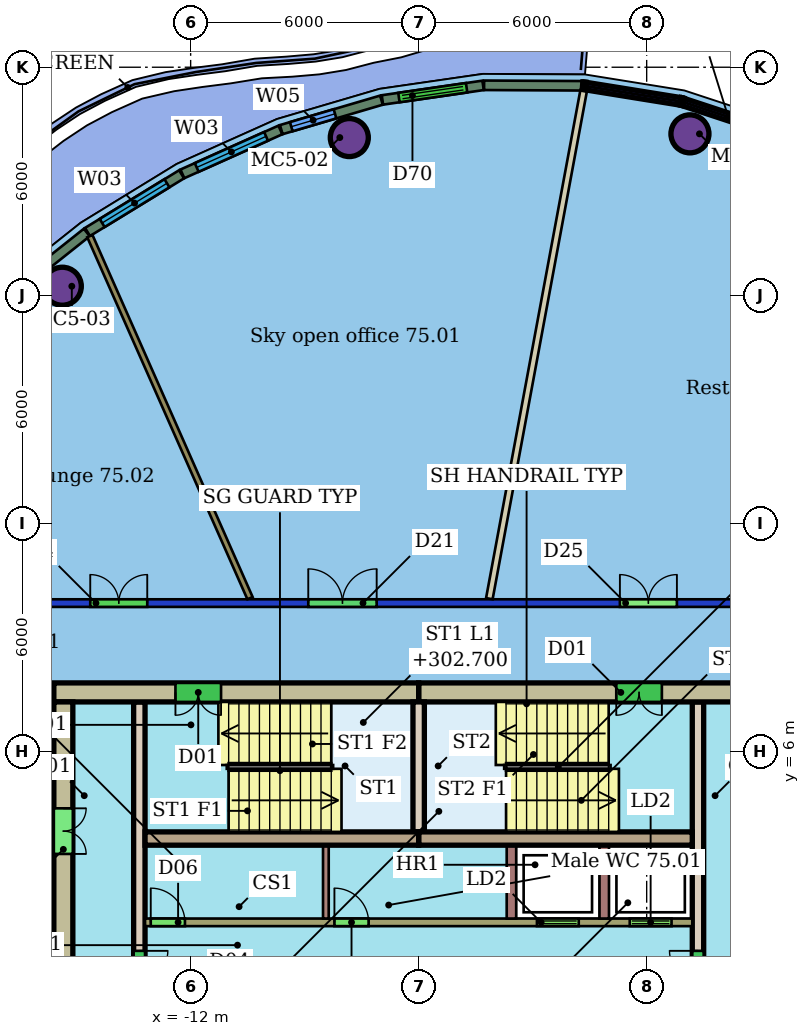
"""IFC4 building model, lengths in metres.
Left out: names, types, materials, properties, quantities, classifications, styles, units other than length and angle.
Written with IfcOpenShell. Run it as: python <this file> out.ifc"""

import sys

from ifc_helpers import new_model, si_unit, direction, frame, frame_2d, origin, origin_2d, place, context, subcontext, project, spatial, rectangle, hollow_circle, extrude, element, fill, save


model = new_model("IFC4")
c1 = context("Model", 3, precision=1e-05, world=origin(), true_north=direction((0.0, 1.0)))
c2 = subcontext(c1, "Body", "Model", "MODEL_VIEW")
j1 = project(units=[si_unit("LENGTHUNIT", "METRE"), si_unit("PLANEANGLEUNIT", "RADIAN")], contexts=[c1])
p1 = place(None, origin())
s1 = spatial("IfcSite", under=j1, at=p1, CompositionType="ELEMENT")
p2 = place(p1, origin())
s2 = spatial("IfcBuilding", under=s1, at=p2, CompositionType="ELEMENT")
p3 = place(p2, frame((0.0, 0.0, 300.9)))
s3 = spatial("IfcBuildingStorey", under=s2, at=p3, CompositionType="ELEMENT", Elevation=300.9)
for number, where, z_axis, x_axis in (
    (1, (1.138, 22.247, 0.0), (0.0, 0.0, 1.0), (1.0, 0.0, 0.0)),
    (2, (-7.825, 22.149, 0.0), (0.0, 0.0, 1.0), (1.0, 0.0, 0.0)),
    (3, (-15.377, 18.238, 0.0), (0.0, 0.0, 1.0), (1.0, 0.0, 0.0)),
):
    element("IfcColumn", number, at=place(p3, frame(where, z_axis=z_axis, x_axis=x_axis)), inside=s3, PredefinedType="COLUMN", context=c2, shape_type="SweptSolid", body=[
        extrude(hollow_circle(Radius=0.5, WallThickness=0.04, at=origin_2d()), origin(), (0.0, 0.0, 1.0), 3.4),
    ])
p4 = place(p3, frame((-20.4, 9.9, 0.0), z_axis=(0.0, 0.0, 1.0), x_axis=(1.0, 0.0, 0.0)))
e4 = element("IfcWall", 4, at=p4, inside=s3, PredefinedType="PARTITIONING", context=c2, shape_type="SweptSolid", body=[
    extrude(rectangle(XDim=28.8, YDim=0.2, at=frame_2d((14.4, 0.0))), origin(), (0.0, 0.0, 1.0), 3.05),
])
p5 = place(p4, frame((11.495, 0.0, 0.0)))
e5 = element("IfcOpeningElement", 5, at=p5, cuts=e4, PredefinedType="OPENING", context=c2, shape_type="SweptSolid", body=[
    extrude(rectangle(XDim=1.8, YDim=2.1, at=frame_2d((0.9, 1.05))), frame((0.0, 0.11, 0.0), z_axis=(0.0, -1.0, 0.0), x_axis=(1.0, 0.0, 0.0)), (0.0, 0.0, 1.0), 0.22),
])
p6 = place(p4, frame((5.758, 0.0, 0.0)))
e6 = element("IfcOpeningElement", 6, at=p6, cuts=e4, PredefinedType="OPENING", context=c2, shape_type="SweptSolid", body=[
    extrude(rectangle(XDim=1.5, YDim=2.1, at=frame_2d((0.75, 1.05))), frame((0.0, 0.11, 0.0), z_axis=(0.0, -1.0, 0.0), x_axis=(1.0, 0.0, 0.0)), (0.0, 0.0, 1.0), 0.22),
])
p7 = place(p4, frame((19.695, 0.0, 0.0)))
e7 = element("IfcOpeningElement", 7, at=p7, cuts=e4, PredefinedType="OPENING", context=c2, shape_type="SweptSolid", body=[
    extrude(rectangle(XDim=1.5, YDim=2.4, at=frame_2d((0.75, 1.2))), frame((0.0, 0.11, 0.0), z_axis=(0.0, -1.0, 0.0), x_axis=(1.0, 0.0, 0.0)), (0.0, 0.0, 1.0), 0.22),
])
p8 = place(p3, frame((-1.658, 23.387, 0.0), z_axis=(0.0, 0.0, 1.0), x_axis=(-0.1825398841, -0.983198449303, 0.0)))
e8 = element("IfcWall", 8, at=p8, inside=s3, PredefinedType="PARTITIONING", context=c2, shape_type="SweptSolid", body=[
    extrude(rectangle(XDim=13.599, YDim=0.175, at=frame_2d((6.8, 0.0))), origin(), (0.0, 0.0, 1.0), 3.4),
])
p9 = place(p3, frame((-14.652, 19.557, 0.0), z_axis=(0.0, 0.0, 1.0), x_axis=(0.4045614234, -0.914510828091, 0.0)))
e9 = element("IfcWall", 9, at=p9, inside=s3, PredefinedType="PARTITIONING", context=c2, shape_type="SweptSolid", body=[
    extrude(rectangle(XDim=10.418, YDim=0.15, at=frame_2d((5.209, 0.0))), origin(), (0.0, 0.0, 1.0), 3.4),
])
p10 = place(p3, frame((-1.703, 23.511, 0.0), z_axis=(0.0, 0.0, 1.0), x_axis=(-0.999986408608, 0.005213693476, 0.0)))
e10 = element("IfcWall", 10, at=p10, inside=s3, PredefinedType="SOLIDWALL", context=c2, shape_type="SweptSolid", body=[
    extrude(rectangle(XDim=2.575, YDim=0.25, at=frame_2d((1.288, 0.0))), origin(), (0.0, 0.0, 1.0), 3.1),
])
p11 = place(p3, frame((-4.305, 23.523, 0.0), z_axis=(0.0, 0.0, 1.0), x_axis=(-0.989681415389, -0.143285365734, 0.0)))
e11 = element("IfcWall", 11, at=p11, inside=s3, PredefinedType="SOLIDWALL", context=c2, shape_type="SweptSolid", body=[
    extrude(rectangle(XDim=2.677, YDim=0.25, at=frame_2d((1.338, 0.0))), origin(), (0.0, 0.0, 1.0), 3.1),
])
p12 = place(p11, frame((0.438, 0.0, 0.0)))
e12 = element("IfcOpeningElement", 12, at=p12, cuts=e11, PredefinedType="OPENING", context=c2, shape_type="SweptSolid", body=[
    extrude(rectangle(XDim=1.8, YDim=2.4, at=frame_2d((0.9, 1.2))), frame((0.0, 0.135, 0.0), z_axis=(0.0, -1.0, 0.0), x_axis=(1.0, 0.0, 0.0)), (0.0, 0.0, 1.0), 0.27),
])
p13 = place(p3, frame((-6.979, 23.134, 0.0), z_axis=(0.0, 0.0, 1.0), x_axis=(-0.959345694886, -0.282233657992, 0.0)))
e13 = element("IfcWall", 13, at=p13, inside=s3, PredefinedType="SOLIDWALL", context=c2, shape_type="SweptSolid", body=[
    extrude(rectangle(XDim=2.748, YDim=0.25, at=frame_2d((1.374, 0.0))), origin(), (0.0, 0.0, 1.0), 3.1),
])
p14 = place(p13, frame((1.274, 0.0, 0.9)))
e14 = element("IfcOpeningElement", 14, at=p14, cuts=e13, PredefinedType="OPENING", context=c2, shape_type="SweptSolid", body=[
    extrude(rectangle(XDim=1.2, YDim=2.1, at=frame_2d((0.6, 1.05))), frame((0.0, 0.135, 0.0), z_axis=(0.0, -1.0, 0.0), x_axis=(1.0, 0.0, 0.0)), (0.0, 0.0, 1.0), 0.27),
])
p15 = place(p3, frame((-9.639, 22.35, 0.0), z_axis=(0.0, 0.0, 1.0), x_axis=(-0.912517109303, -0.409038537585, 0.0)))
e15 = element("IfcWall", 15, at=p15, inside=s3, PredefinedType="SOLIDWALL", context=c2, shape_type="SweptSolid", body=[
    extrude(rectangle(XDim=2.825, YDim=0.25, at=frame_2d((1.413, 0.0))), origin(), (0.0, 0.0, 1.0), 3.1),
])
p16 = place(p15, frame((0.413, 0.0, 0.9)))
e16 = element("IfcOpeningElement", 16, at=p16, cuts=e15, PredefinedType="OPENING", context=c2, shape_type="SweptSolid", body=[
    extrude(rectangle(XDim=2.0, YDim=2.1, at=frame_2d((1.0, 1.05))), frame((0.0, 0.135, 0.0), z_axis=(0.0, -1.0, 0.0), x_axis=(1.0, 0.0, 0.0)), (0.0, 0.0, 1.0), 0.27),
])
p17 = place(p3, frame((-12.238, 21.183, 0.0), z_axis=(0.0, 0.0, 1.0), x_axis=(-0.852693082588, -0.522412200189, 0.0)))
e17 = element("IfcWall", 17, at=p17, inside=s3, PredefinedType="SOLIDWALL", context=c2, shape_type="SweptSolid", body=[
    extrude(rectangle(XDim=2.904, YDim=0.25, at=frame_2d((1.452, 0.0))), origin(), (0.0, 0.0, 1.0), 3.1),
])
p18 = place(p17, frame((0.452, 0.0, 0.9)))
e18 = element("IfcOpeningElement", 18, at=p18, cuts=e17, PredefinedType="OPENING", context=c2, shape_type="SweptSolid", body=[
    extrude(rectangle(XDim=2.0, YDim=2.1, at=frame_2d((1.0, 1.05))), frame((0.0, 0.135, 0.0), z_axis=(0.0, -1.0, 0.0), x_axis=(1.0, 0.0, 0.0)), (0.0, 0.0, 1.0), 0.27),
])
p19 = place(p3, frame((-14.733, 19.652, 0.0), z_axis=(0.0, 0.0, 1.0), x_axis=(-0.782610135425, -0.622512149222, 0.0)))
e19 = element("IfcWall", 19, at=p19, inside=s3, PredefinedType="SOLIDWALL", context=c2, shape_type="SweptSolid", body=[
    extrude(rectangle(XDim=2.977, YDim=0.25, at=frame_2d((1.488, 0.0))), origin(), (0.0, 0.0, 1.0), 3.1),
])
p20 = place(p19, frame((1.588, 0.0, 0.9)))
e20 = element("IfcOpeningElement", 20, at=p20, cuts=e19, PredefinedType="OPENING", context=c2, shape_type="SweptSolid", body=[
    extrude(rectangle(XDim=1.2, YDim=2.1, at=frame_2d((0.6, 1.05))), frame((0.0, 0.135, 0.0), z_axis=(0.0, -1.0, 0.0), x_axis=(1.0, 0.0, 0.0)), (0.0, 0.0, 1.0), 0.27),
])
p21 = place(p3, frame((3.6, 7.55, 0.0), z_axis=(0.0, 0.0, 1.0), x_axis=(-1.0, 0.0, 0.0)))
e21 = element("IfcWall", 21, at=p21, inside=s3, PredefinedType="SHEAR", context=c2, shape_type="SweptSolid", body=[
    extrude(rectangle(XDim=9.6, YDim=0.5, at=frame_2d((4.8, 0.0))), origin(), (0.0, 0.0, 1.0), 3.3),
])
p22 = place(p21, frame((3.2, 0.0, 0.0)))
e22 = element("IfcOpeningElement", 22, at=p22, cuts=e21, PredefinedType="OPENING", context=c2, shape_type="SweptSolid", body=[
    extrude(rectangle(XDim=1.2, YDim=2.1, at=frame_2d((0.6, 1.05))), frame((0.0, 0.26, 0.0), z_axis=(0.0, -1.0, 0.0), x_axis=(1.0, 0.0, 0.0)), (0.0, 0.0, 1.0), 0.52),
])
p23 = place(p3, frame((-6.0, 7.55, 0.0), z_axis=(0.0, 0.0, 1.0), x_axis=(-1.0, 0.0, 0.0)))
e23 = element("IfcWall", 23, at=p23, inside=s3, PredefinedType="SHEAR", context=c2, shape_type="SweptSolid", body=[
    extrude(rectangle(XDim=9.6, YDim=0.5, at=frame_2d((4.8, 0.0))), origin(), (0.0, 0.0, 1.0), 3.3),
])
p24 = place(p23, frame((5.2, 0.0, 0.0)))
e24 = element("IfcOpeningElement", 24, at=p24, cuts=e23, PredefinedType="OPENING", context=c2, shape_type="SweptSolid", body=[
    extrude(rectangle(XDim=1.2, YDim=2.1, at=frame_2d((0.6, 1.05))), frame((0.0, 0.26, 0.0), z_axis=(0.0, -1.0, 0.0), x_axis=(1.0, 0.0, 0.0)), (0.0, 0.0, 1.0), 0.52),
])
p25 = place(p3, frame((-15.35, 7.3, 0.0), z_axis=(0.0, 0.0, 1.0), x_axis=(0.0, -1.0, 0.0)))
e25 = element("IfcWall", 25, at=p25, inside=s3, PredefinedType="SHEAR", context=c2, shape_type="SweptSolid", body=[
    extrude(rectangle(XDim=14.6, YDim=0.5, at=frame_2d((7.3, 0.0))), origin(), (0.0, 0.0, 1.0), 3.3),
])
p26 = place(p25, frame((10.6, 0.0, 0.0)))
e26 = element("IfcOpeningElement", 26, at=p26, cuts=e25, PredefinedType="OPENING", context=c2, shape_type="SweptSolid", body=[
    extrude(rectangle(XDim=1.2, YDim=2.1, at=frame_2d((0.6, 1.05))), frame((0.0, 0.26, 0.0), z_axis=(0.0, -1.0, 0.0), x_axis=(1.0, 0.0, 0.0)), (0.0, 0.0, 1.0), 0.52),
])
p27 = place(p25, frame((2.8, 0.0, 0.0)))
e27 = element("IfcOpeningElement", 27, at=p27, cuts=e25, PredefinedType="OPENING", context=c2, shape_type="SweptSolid", body=[
    extrude(rectangle(XDim=1.2, YDim=2.1, at=frame_2d((0.6, 1.05))), frame((0.0, 0.26, 0.0), z_axis=(0.0, -1.0, 0.0), x_axis=(1.0, 0.0, 0.0)), (0.0, 0.0, 1.0), 0.52),
])
for number, where, z_axis, x_axis in (
    (28, (-13.2, 3.705, 0.0), (0.0, 0.0, 1.0), (1.0, 0.0, 0.0)),
    (29, (-6.0, 3.705, 0.0), (0.0, 0.0, 1.0), (1.0, 0.0, 0.0)),
):
    element("IfcWall", number, at=place(p3, frame(where, z_axis=z_axis, x_axis=x_axis)), inside=s3, PredefinedType="SHEAR", context=c2, shape_type="SweptSolid", body=[
        extrude(rectangle(XDim=7.2, YDim=0.35, at=frame_2d((3.6, 0.0))), origin(), (0.0, 0.0, 1.0), 3.3),
    ])
p28 = place(p3, frame((-13.35, 7.3, 0.0), z_axis=(0.0, 0.0, 1.0), x_axis=(0.0, -1.0, 0.0)))
e30 = element("IfcWall", 30, at=p28, inside=s3, PredefinedType="SHEAR", context=c2, shape_type="SweptSolid", body=[
    extrude(rectangle(XDim=14.6, YDim=0.3, at=frame_2d((7.3, 0.0))), origin(), (0.0, 0.0, 1.0), 3.3),
])
p29 = place(p28, frame((6.55, 0.0, 0.0)))
e31 = element("IfcOpeningElement", 31, at=p29, cuts=e30, PredefinedType="OPENING", context=c2, shape_type="SweptSolid", body=[
    extrude(rectangle(XDim=1.5, YDim=2.1, at=frame_2d((0.75, 1.05))), frame((0.0, 0.16, 0.0), z_axis=(0.0, -1.0, 0.0), x_axis=(1.0, 0.0, 0.0)), (0.0, 0.0, 1.0), 0.32),
])
p30 = place(p3, frame((1.35, -7.3, 0.0), z_axis=(0.0, 0.0, 1.0), x_axis=(0.0, 1.0, 0.0)))
e32 = element("IfcWall", 32, at=p30, inside=s3, PredefinedType="SHEAR", context=c2, shape_type="SweptSolid", body=[
    extrude(rectangle(XDim=14.6, YDim=0.3, at=frame_2d((7.3, 0.0))), origin(), (0.0, 0.0, 1.0), 3.3),
])
p31 = place(p30, frame((1.21, 0.0, 0.0)))
e33 = element("IfcOpeningElement", 33, at=p31, cuts=e32, PredefinedType="OPENING", context=c2, shape_type="SweptSolid", body=[
    extrude(rectangle(XDim=1.0, YDim=2.1, at=frame_2d((0.5, 1.05))), frame((0.0, 0.16, 0.0), z_axis=(0.0, -1.0, 0.0), x_axis=(1.0, 0.0, 0.0)), (0.0, 0.0, 1.0), 0.32),
])
p32 = place(p30, frame((6.55, 0.0, 0.0)))
e34 = element("IfcOpeningElement", 34, at=p32, cuts=e32, PredefinedType="OPENING", context=c2, shape_type="SweptSolid", body=[
    extrude(rectangle(XDim=1.5, YDim=2.1, at=frame_2d((0.75, 1.05))), frame((0.0, 0.16, 0.0), z_axis=(0.0, -1.0, 0.0), x_axis=(1.0, 0.0, 0.0)), (0.0, 0.0, 1.0), 0.32),
])
p33 = place(p3, frame((-13.2, 1.5, 0.0), z_axis=(0.0, 0.0, 1.0), x_axis=(1.0, 0.0, 0.0)))
e35 = element("IfcWall", 35, at=p33, inside=s3, PredefinedType="SHEAR", context=c2, shape_type="SweptSolid", body=[
    extrude(rectangle(XDim=14.4, YDim=0.2, at=frame_2d((7.2, 0.0))), origin(), (0.0, 0.0, 1.0), 3.3),
])
p34 = place(p33, frame((10.312, 0.0, 0.0)))
e36 = element("IfcOpeningElement", 36, at=p34, cuts=e35, PredefinedType="OPENING", context=c2, shape_type="SweptSolid", body=[
    extrude(rectangle(XDim=1.1, YDim=2.1, at=frame_2d((0.55, 1.05))), frame((0.0, 0.11, 0.0), z_axis=(0.0, -1.0, 0.0), x_axis=(1.0, 0.0, 0.0)), (0.0, 0.0, 1.0), 0.22),
])
p35 = place(p33, frame((12.754, 0.0, 0.0)))
e37 = element("IfcOpeningElement", 37, at=p35, cuts=e35, PredefinedType="OPENING", context=c2, shape_type="SweptSolid", body=[
    extrude(rectangle(XDim=1.1, YDim=2.1, at=frame_2d((0.55, 1.05))), frame((0.0, 0.11, 0.0), z_axis=(0.0, -1.0, 0.0), x_axis=(1.0, 0.0, 0.0)), (0.0, 0.0, 1.0), 0.22),
])
p36 = place(p33, frame((0.15, 0.0, 0.0)))
e38 = element("IfcOpeningElement", 38, at=p36, cuts=e35, PredefinedType="OPENING", context=c2, shape_type="SweptSolid", body=[
    extrude(rectangle(XDim=0.9, YDim=2.1, at=frame_2d((0.45, 1.05))), frame((0.0, 0.11, 0.0), z_axis=(0.0, -1.0, 0.0), x_axis=(1.0, 0.0, 0.0)), (0.0, 0.0, 1.0), 0.22),
])
p37 = place(p33, frame((4.983, 0.0, 0.0)))
e39 = element("IfcOpeningElement", 39, at=p37, cuts=e35, PredefinedType="OPENING", context=c2, shape_type="SweptSolid", body=[
    extrude(rectangle(XDim=0.9, YDim=2.1, at=frame_2d((0.45, 1.05))), frame((0.0, 0.11, 0.0), z_axis=(0.0, -1.0, 0.0), x_axis=(1.0, 0.0, 0.0)), (0.0, 0.0, 1.0), 0.22),
])
p38 = place(p3, frame((-6.0, 3.88, 0.0), z_axis=(0.0, 0.0, 1.0), x_axis=(0.0, 1.0, 0.0)))
e40 = element("IfcWall", 40, at=p38, inside=s3, PredefinedType="SHEAR", context=c2, shape_type="SweptSolid", body=[
    extrude(rectangle(XDim=3.42, YDim=0.3, at=frame_2d((1.71, 0.0))), origin(), (0.0, 0.0, 1.0), 3.3),
])
for number, where, z_axis, x_axis in (
    (41, (-3.558, 1.6, 0.0), (0.0, 0.0, 1.0), (0.0, 1.0, 0.0)),
    (42, (-1.117, 1.6, 0.0), (0.0, 0.0, 1.0), (0.0, 1.0, 0.0)),
):
    element("IfcWall", number, at=place(p3, frame(where, z_axis=z_axis, x_axis=x_axis)), inside=s3, PredefinedType="SHEAR", context=c2, shape_type="SweptSolid", body=[
        extrude(rectangle(XDim=1.93, YDim=0.25, at=frame_2d((0.965, 0.0))), origin(), (0.0, 0.0, 1.0), 3.3),
    ])
p39 = place(p3, frame((-8.442, 1.6, 0.0), z_axis=(0.0, 0.0, 1.0), x_axis=(0.0, 1.0, 0.0)))
e43 = element("IfcWall", 43, at=p39, inside=s3, PredefinedType="PARTITIONING", context=c2, shape_type="SweptSolid", body=[
    extrude(rectangle(XDim=1.93, YDim=0.15, at=frame_2d((0.965, 0.0))), origin(), (0.0, 0.0, 1.0), 3.3),
])
p40 = place(p5, origin())
e44 = element("IfcDoor", 44, at=p40, inside=s3, OperationType="DOUBLE_DOOR_SINGLE_SWING", PredefinedType="DOOR", context=c2, shape_type="SweptSolid", body=[
    extrude(rectangle(XDim=1.8, YDim=2.1, at=frame_2d((0.9, 1.05))), frame((0.0, 0.025, 0.0), z_axis=(0.0, -1.0, 0.0), x_axis=(1.0, 0.0, 0.0)), (0.0, 0.0, 1.0), 0.05),
])
fill(e5, e44)
p41 = place(p6, origin())
e45 = element("IfcDoor", 45, at=p41, inside=s3, OperationType="DOUBLE_DOOR_SINGLE_SWING", PredefinedType="DOOR", context=c2, shape_type="SweptSolid", body=[
    extrude(rectangle(XDim=1.5, YDim=2.1, at=frame_2d((0.75, 1.05))), frame((0.0, 0.025, 0.0), z_axis=(0.0, -1.0, 0.0), x_axis=(1.0, 0.0, 0.0)), (0.0, 0.0, 1.0), 0.05),
])
fill(e6, e45)
p42 = place(p7, origin())
e46 = element("IfcDoor", 46, at=p42, inside=s3, OperationType="DOUBLE_DOOR_SINGLE_SWING", PredefinedType="DOOR", context=c2, shape_type="SweptSolid", body=[
    extrude(rectangle(XDim=1.5, YDim=2.4, at=frame_2d((0.75, 1.2))), frame((0.0, 0.025, 0.0), z_axis=(0.0, -1.0, 0.0), x_axis=(1.0, 0.0, 0.0)), (0.0, 0.0, 1.0), 0.05),
])
fill(e7, e46)
p43 = place(p12, origin())
e47 = element("IfcDoor", 47, at=p43, inside=s3, OperationType="DOUBLE_DOOR_SLIDING", PredefinedType="DOOR", context=c2, shape_type="SweptSolid", body=[
    extrude(rectangle(XDim=1.8, YDim=2.4, at=frame_2d((0.9, 1.2))), frame((0.0, 0.025, 0.0), z_axis=(0.0, -1.0, 0.0), x_axis=(1.0, 0.0, 0.0)), (0.0, 0.0, 1.0), 0.05),
])
fill(e12, e47)
p44 = place(p14, origin())
e48 = element("IfcWindow", 48, at=p44, inside=s3, PartitioningType="SINGLE_PANEL", PredefinedType="WINDOW", context=c2, shape_type="SweptSolid", body=[
    extrude(rectangle(XDim=1.2, YDim=2.1, at=frame_2d((0.6, 1.05))), frame((0.0, 0.03, 0.0), z_axis=(0.0, -1.0, 0.0), x_axis=(1.0, 0.0, 0.0)), (0.0, 0.0, 1.0), 0.06),
])
fill(e14, e48)
p45 = place(p16, origin())
e49 = element("IfcWindow", 49, at=p45, inside=s3, PartitioningType="SINGLE_PANEL", PredefinedType="WINDOW", context=c2, shape_type="SweptSolid", body=[
    extrude(rectangle(XDim=2.0, YDim=2.1, at=frame_2d((1.0, 1.05))), frame((0.0, 0.03, 0.0), z_axis=(0.0, -1.0, 0.0), x_axis=(1.0, 0.0, 0.0)), (0.0, 0.0, 1.0), 0.06),
])
fill(e16, e49)
p46 = place(p18, origin())
e50 = element("IfcWindow", 50, at=p46, inside=s3, PartitioningType="SINGLE_PANEL", PredefinedType="WINDOW", context=c2, shape_type="SweptSolid", body=[
    extrude(rectangle(XDim=2.0, YDim=2.1, at=frame_2d((1.0, 1.05))), frame((0.0, 0.03, 0.0), z_axis=(0.0, -1.0, 0.0), x_axis=(1.0, 0.0, 0.0)), (0.0, 0.0, 1.0), 0.06),
])
fill(e18, e50)
p47 = place(p22, origin())
e51 = element("IfcDoor", 51, at=p47, inside=s3, OperationType="DOUBLE_DOOR_SINGLE_SWING", PredefinedType="NOTDEFINED", context=c2, shape_type="SweptSolid", body=[
    extrude(rectangle(XDim=1.2, YDim=2.1, at=frame_2d((0.6, 1.05))), frame((0.0, 0.025, 0.0), z_axis=(0.0, -1.0, 0.0), x_axis=(1.0, 0.0, 0.0)), (0.0, 0.0, 1.0), 0.05),
])
fill(e22, e51)
p48 = place(p24, origin())
e52 = element("IfcDoor", 52, at=p48, inside=s3, OperationType="DOUBLE_DOOR_SINGLE_SWING", PredefinedType="NOTDEFINED", context=c2, shape_type="SweptSolid", body=[
    extrude(rectangle(XDim=1.2, YDim=2.1, at=frame_2d((0.6, 1.05))), frame((0.0, 0.025, 0.0), z_axis=(0.0, -1.0, 0.0), x_axis=(1.0, 0.0, 0.0)), (0.0, 0.0, 1.0), 0.05),
])
fill(e24, e52)
p49 = place(p27, origin())
e53 = element("IfcDoor", 53, at=p49, inside=s3, OperationType="DOUBLE_DOOR_SINGLE_SWING", PredefinedType="NOTDEFINED", context=c2, shape_type="SweptSolid", body=[
    extrude(rectangle(XDim=1.2, YDim=2.1, at=frame_2d((0.6, 1.05))), frame((0.0, 0.025, 0.0), z_axis=(0.0, -1.0, 0.0), x_axis=(1.0, 0.0, 0.0)), (0.0, 0.0, 1.0), 0.05),
])
fill(e27, e53)
p50 = place(p29, origin())
e54 = element("IfcDoor", 54, at=p50, inside=s3, OperationType="DOUBLE_DOOR_SINGLE_SWING", PredefinedType="NOTDEFINED", context=c2, shape_type="SweptSolid", body=[
    extrude(rectangle(XDim=1.5, YDim=2.1, at=frame_2d((0.75, 1.05))), frame((0.0, 0.025, 0.0), z_axis=(0.0, -1.0, 0.0), x_axis=(1.0, 0.0, 0.0)), (0.0, 0.0, 1.0), 0.05),
])
fill(e31, e54)
p51 = place(p32, origin())
e55 = element("IfcDoor", 55, at=p51, inside=s3, OperationType="DOUBLE_DOOR_SINGLE_SWING", PredefinedType="NOTDEFINED", context=c2, shape_type="SweptSolid", body=[
    extrude(rectangle(XDim=1.5, YDim=2.1, at=frame_2d((0.75, 1.05))), frame((0.0, 0.025, 0.0), z_axis=(0.0, -1.0, 0.0), x_axis=(1.0, 0.0, 0.0)), (0.0, 0.0, 1.0), 0.05),
])
fill(e34, e55)
p52 = place(p34, origin())
e56 = element("IfcDoor", 56, at=p52, inside=s3, OperationType="DOUBLE_DOOR_SLIDING", PredefinedType="NOTDEFINED", context=c2, shape_type="SweptSolid", body=[
    extrude(rectangle(XDim=1.1, YDim=2.1, at=frame_2d((0.55, 1.05))), frame((0.0, 0.025, 0.0), z_axis=(0.0, -1.0, 0.0), x_axis=(1.0, 0.0, 0.0)), (0.0, 0.0, 1.0), 0.05),
])
fill(e36, e56)
p53 = place(p35, origin())
e57 = element("IfcDoor", 57, at=p53, inside=s3, OperationType="DOUBLE_DOOR_SLIDING", PredefinedType="NOTDEFINED", context=c2, shape_type="SweptSolid", body=[
    extrude(rectangle(XDim=1.1, YDim=2.1, at=frame_2d((0.55, 1.05))), frame((0.0, 0.025, 0.0), z_axis=(0.0, -1.0, 0.0), x_axis=(1.0, 0.0, 0.0)), (0.0, 0.0, 1.0), 0.05),
])
fill(e37, e57)
p54 = place(p36, origin())
e58 = element("IfcDoor", 58, at=p54, inside=s3, OperationType="SINGLE_SWING_LEFT", PredefinedType="NOTDEFINED", context=c2, shape_type="SweptSolid", body=[
    extrude(rectangle(XDim=0.9, YDim=2.1, at=frame_2d((0.45, 1.05))), frame((0.0, 0.025, 0.0), z_axis=(0.0, -1.0, 0.0), x_axis=(1.0, 0.0, 0.0)), (0.0, 0.0, 1.0), 0.05),
])
fill(e38, e58)
p55 = place(p37, origin())
e59 = element("IfcDoor", 59, at=p55, inside=s3, OperationType="SINGLE_SWING_LEFT", PredefinedType="NOTDEFINED", context=c2, shape_type="SweptSolid", body=[
    extrude(rectangle(XDim=0.9, YDim=2.1, at=frame_2d((0.45, 1.05))), frame((0.0, 0.025, 0.0), z_axis=(0.0, -1.0, 0.0), x_axis=(1.0, 0.0, 0.0)), (0.0, 0.0, 1.0), 0.05),
])
fill(e39, e59)
save(model, sys.argv[1])
